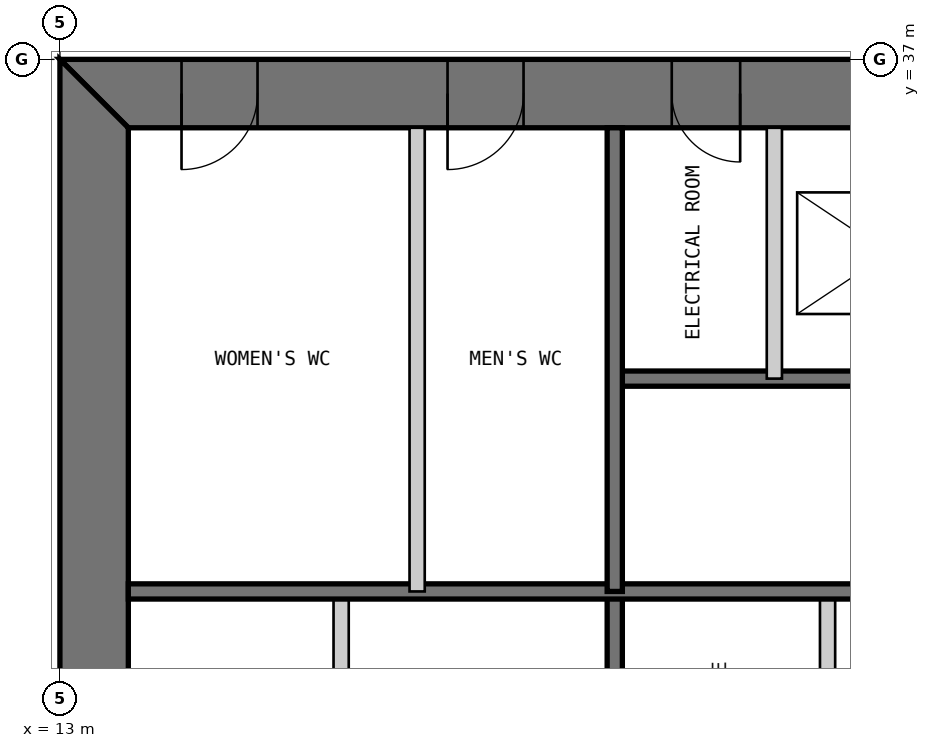
"""IFC4 building model, lengths in metres.
Left out: names, types, materials, properties, quantities, classifications, styles, units other than length and angle.
Written with IfcOpenShell. Run it as: python <this file> out.ifc"""

import sys

from ifc_helpers import new_model, si_unit, direction, frame, frame_2d, origin, place, context, subcontext, project, spatial, polyline, rectangle, outline, extrude, element, fill, save


model = new_model("IFC4")
c1 = context("Model", 3, precision=1e-05, world=origin(), true_north=direction((0.0, 1.0)))
c2 = subcontext(c1, "Body", "Model", "MODEL_VIEW")
j1 = project(units=[si_unit("LENGTHUNIT", "METRE"), si_unit("PLANEANGLEUNIT", "RADIAN")], contexts=[c1])
p1 = place(None, origin())
s1 = spatial("IfcSite", under=j1, at=p1, CompositionType="ELEMENT")
p2 = place(p1, origin())
s2 = spatial("IfcBuilding", under=s1, at=p2, CompositionType="ELEMENT")
p3 = place(p2, frame((0.0, 0.0, 293.4)))
s3 = spatial("IfcBuildingStorey", under=s2, at=p3, CompositionType="ELEMENT", Elevation=293.4)
p4 = place(p3, frame((37.0, 36.55, 0.0), z_axis=(0.0, 0.0, 1.0), x_axis=(-1.0, 0.0, 0.0)))
e1 = element("IfcWall", 1, at=p4, inside=s3, PredefinedType="SHEAR", context=c2, shape_type="SweptSolid", body=[
    extrude(outline(polyline([(0.0, -0.45), (24.0, -0.45), (23.1, 0.45), (0.9, 0.45), (0.0, -0.45)])), origin(), (0.0, 0.0, 1.0), 3.4),
])
p5 = place(p4, frame((4.9, 0.0, 0.0)))
e2 = element("IfcOpeningElement", 2, at=p5, cuts=e1, PredefinedType="OPENING", context=c2, shape_type="SweptSolid", body=[
    extrude(rectangle(XDim=1.0, YDim=2.2, at=frame_2d((0.5, 1.1))), frame((0.0, 0.46, 0.0), z_axis=(0.0, -1.0, 0.0), x_axis=(1.0, 0.0, 0.0)), (0.0, 0.0, 1.0), 0.92),
])
p6 = place(p4, frame((8.9, 0.0, 0.0)))
e3 = element("IfcOpeningElement", 3, at=p6, cuts=e1, PredefinedType="OPENING", context=c2, shape_type="SweptSolid", body=[
    extrude(rectangle(XDim=1.1, YDim=2.2, at=frame_2d((0.55, 1.1))), frame((0.0, 0.46, 0.0), z_axis=(0.0, -1.0, 0.0), x_axis=(1.0, 0.0, 0.0)), (0.0, 0.0, 1.0), 0.92),
])
p7 = place(p4, frame((15.05, 0.0, 0.0)))
e4 = element("IfcOpeningElement", 4, at=p7, cuts=e1, PredefinedType="OPENING", context=c2, shape_type="SweptSolid", body=[
    extrude(rectangle(XDim=0.9, YDim=2.2, at=frame_2d((0.45, 1.1))), frame((0.0, 0.46, 0.0), z_axis=(0.0, -1.0, 0.0), x_axis=(1.0, 0.0, 0.0)), (0.0, 0.0, 1.0), 0.92),
])
p8 = place(p4, frame((17.9, 0.0, 0.0)))
e5 = element("IfcOpeningElement", 5, at=p8, cuts=e1, PredefinedType="OPENING", context=c2, shape_type="SweptSolid", body=[
    extrude(rectangle(XDim=1.0, YDim=2.2, at=frame_2d((0.5, 1.1))), frame((0.0, 0.46, 0.0), z_axis=(0.0, -1.0, 0.0), x_axis=(1.0, 0.0, 0.0)), (0.0, 0.0, 1.0), 0.92),
])
p9 = place(p4, frame((21.4, 0.0, 0.0)))
e6 = element("IfcOpeningElement", 6, at=p9, cuts=e1, PredefinedType="OPENING", context=c2, shape_type="SweptSolid", body=[
    extrude(rectangle(XDim=1.0, YDim=2.2, at=frame_2d((0.5, 1.1))), frame((0.0, 0.46, 0.0), z_axis=(0.0, -1.0, 0.0), x_axis=(1.0, 0.0, 0.0)), (0.0, 0.0, 1.0), 0.92),
])
p10 = place(p3, frame((13.45, 36.1, 0.0), z_axis=(0.0, 0.0, 1.0), x_axis=(0.0, -1.0, 0.0)))
e7 = element("IfcWall", 7, at=p10, inside=s3, PredefinedType="SHEAR", context=c2, shape_type="SweptSolid", body=[
    extrude(outline(polyline([(-0.9, -0.45), (23.1, -0.45), (22.2, 0.45), (0.0, 0.45), (-0.9, -0.45)])), origin(), (0.0, 0.0, 1.0), 3.4),
])
p11 = place(p10, frame((20.2, 0.0, 0.0)))
e8 = element("IfcOpeningElement", 8, at=p11, cuts=e7, PredefinedType="OPENING", context=c2, shape_type="SweptSolid", body=[
    extrude(rectangle(XDim=1.0, YDim=2.2, at=frame_2d((0.5, 1.1))), frame((0.0, 0.46, 0.0), z_axis=(0.0, -1.0, 0.0), x_axis=(1.0, 0.0, 0.0)), (0.0, 0.0, 1.0), 0.92),
])
p12 = place(p10, frame((17.25, 0.0, 0.0)))
e9 = element("IfcOpeningElement", 9, at=p12, cuts=e7, PredefinedType="OPENING", context=c2, shape_type="SweptSolid", body=[
    extrude(rectangle(XDim=0.9, YDim=2.2, at=frame_2d((0.45, 1.1))), frame((0.0, 0.46, 0.0), z_axis=(0.0, -1.0, 0.0), x_axis=(1.0, 0.0, 0.0)), (0.0, 0.0, 1.0), 0.92),
])
p13 = place(p3, frame((16.7, 13.9, 0.0), z_axis=(0.0, 0.0, 1.0), x_axis=(0.0, 1.0, 0.0)))
e10 = element("IfcWall", 10, at=p13, inside=s3, PredefinedType="PARTITIONING", context=c2, shape_type="SweptSolid", body=[
    extrude(rectangle(XDim=16.1, YDim=0.2, at=frame_2d((8.05, 0.0))), origin(), (0.0, 0.0, 1.0), 3.2),
])
p14 = place(p13, frame((7.95, 0.0, 0.0)))
e11 = element("IfcOpeningElement", 11, at=p14, cuts=e10, PredefinedType="OPENING", context=c2, shape_type="SweptSolid", body=[
    extrude(rectangle(XDim=0.9, YDim=2.2, at=frame_2d((0.45, 1.1))), frame((0.0, 0.11, 0.0), z_axis=(0.0, -1.0, 0.0), x_axis=(1.0, 0.0, 0.0)), (0.0, 0.0, 1.0), 0.22),
])
p15 = place(p13, frame((13.3, 0.0, 0.0)))
e12 = element("IfcOpeningElement", 12, at=p15, cuts=e10, PredefinedType="OPENING", context=c2, shape_type="SweptSolid", body=[
    extrude(rectangle(XDim=0.9, YDim=2.2, at=frame_2d((0.45, 1.1))), frame((0.0, 0.11, 0.0), z_axis=(0.0, -1.0, 0.0), x_axis=(1.0, 0.0, 0.0)), (0.0, 0.0, 1.0), 0.22),
])
p16 = place(p3, frame((20.3, 13.9, 0.0), z_axis=(0.0, 0.0, 1.0), x_axis=(0.0, 1.0, 0.0)))
e13 = element("IfcWall", 13, at=p16, inside=s3, PredefinedType="SOLIDWALL", context=c2, shape_type="SweptSolid", body=[
    extrude(rectangle(XDim=16.1, YDim=0.2, at=frame_2d((8.05, 0.0))), origin(), (0.0, 0.0, 1.0), 3.2),
])
p17 = place(p16, frame((6.65, 0.0, 0.0)))
e14 = element("IfcOpeningElement", 14, at=p17, cuts=e13, PredefinedType="OPENING", context=c2, shape_type="SweptSolid", body=[
    extrude(rectangle(XDim=0.9, YDim=2.2, at=frame_2d((0.45, 1.1))), frame((0.0, 0.11, 0.0), z_axis=(0.0, -1.0, 0.0), x_axis=(1.0, 0.0, 0.0)), (0.0, 0.0, 1.0), 0.22),
])
p18 = place(p16, frame((9.35, 0.0, 0.0)))
e15 = element("IfcOpeningElement", 15, at=p18, cuts=e13, PredefinedType="OPENING", context=c2, shape_type="SweptSolid", body=[
    extrude(rectangle(XDim=0.9, YDim=2.2, at=frame_2d((0.45, 1.1))), frame((0.0, 0.11, 0.0), z_axis=(0.0, -1.0, 0.0), x_axis=(1.0, 0.0, 0.0)), (0.0, 0.0, 1.0), 0.22),
])
p19 = place(p16, frame((13.35, 0.0, 0.0)))
e16 = element("IfcOpeningElement", 16, at=p19, cuts=e13, PredefinedType="OPENING", context=c2, shape_type="SweptSolid", body=[
    extrude(rectangle(XDim=0.9, YDim=2.2, at=frame_2d((0.45, 1.1))), frame((0.0, 0.11, 0.0), z_axis=(0.0, -1.0, 0.0), x_axis=(1.0, 0.0, 0.0)), (0.0, 0.0, 1.0), 0.22),
])
p20 = place(p3, frame((23.1, 20.0, 0.0), z_axis=(0.0, 0.0, 1.0), x_axis=(0.0, 1.0, 0.0)))
e17 = element("IfcWall", 17, at=p20, inside=s3, PredefinedType="PARTITIONING", context=c2, shape_type="SweptSolid", body=[
    extrude(rectangle(XDim=10.0, YDim=0.2, at=frame_2d((5.0, 0.0))), origin(), (0.0, 0.0, 1.0), 3.2),
])
p21 = place(p3, frame((29.7, 32.8, 0.0), z_axis=(0.0, 0.0, 1.0), x_axis=(-1.0, 0.0, 0.0)))
e18 = element("IfcWall", 18, at=p21, inside=s3, PredefinedType="SOLIDWALL", context=c2, shape_type="SweptSolid", body=[
    extrude(rectangle(XDim=9.4, YDim=0.2, at=frame_2d((4.7, 0.0))), origin(), (0.0, 0.0, 1.0), 3.2),
])
p22 = place(p21, frame((0.25, 0.0, 0.0)))
e19 = element("IfcOpeningElement", 19, at=p22, cuts=e18, PredefinedType="OPENING", context=c2, shape_type="SweptSolid", body=[
    extrude(rectangle(XDim=1.0, YDim=2.2, at=frame_2d((0.5, 1.1))), frame((0.0, 0.11, 0.0), z_axis=(0.0, -1.0, 0.0), x_axis=(1.0, 0.0, 0.0)), (0.0, 0.0, 1.0), 0.22),
])
p23 = place(p3, frame((29.7, 30.0, 0.0), z_axis=(0.0, 0.0, 1.0), x_axis=(-1.0, 0.0, 0.0)))
e20 = element("IfcWall", 20, at=p23, inside=s3, PredefinedType="SOLIDWALL", context=c2, shape_type="SweptSolid", body=[
    extrude(rectangle(XDim=15.8, YDim=0.2, at=frame_2d((7.9, 0.0))), origin(), (0.0, 0.0, 1.0), 3.2),
])
p24 = place(p3, frame((22.4, 36.1, 0.0), z_axis=(0.0, 0.0, 1.0), x_axis=(0.0, -1.0, 0.0)))
e21 = element("IfcWall", 21, at=p24, inside=s3, PredefinedType="PARTITIONING", context=c2, shape_type="SweptSolid", body=[
    extrude(rectangle(XDim=3.3, YDim=0.2, at=frame_2d((1.65, 0.0))), origin(), (0.0, 0.0, 1.0), 3.2),
])
p25 = place(p3, frame((20.3, 36.1, 0.0), z_axis=(0.0, 0.0, 1.0), x_axis=(0.0, -1.0, 0.0)))
e22 = element("IfcWall", 22, at=p25, inside=s3, PredefinedType="SOLIDWALL", context=c2, shape_type="SweptSolid", body=[
    extrude(rectangle(XDim=6.1, YDim=0.2, at=frame_2d((3.05, 0.0))), origin(), (0.0, 0.0, 1.0), 3.2),
])
p26 = place(p3, frame((17.7, 36.1, 0.0), z_axis=(0.0, 0.0, 1.0), x_axis=(0.0, -1.0, 0.0)))
e23 = element("IfcWall", 23, at=p26, inside=s3, PredefinedType="PARTITIONING", context=c2, shape_type="SweptSolid", body=[
    extrude(rectangle(XDim=6.1, YDim=0.2, at=frame_2d((3.05, 0.0))), origin(), (0.0, 0.0, 1.0), 3.2),
])
p27 = place(p7, origin())
e24 = element("IfcDoor", 24, at=p27, inside=s3, OperationType="SINGLE_SWING_LEFT", PredefinedType="DOOR", context=c2, shape_type="SweptSolid", body=[
    extrude(rectangle(XDim=0.9, YDim=2.2, at=frame_2d((0.45, 1.1))), frame((0.0, 0.025, 0.0), z_axis=(0.0, -1.0, 0.0), x_axis=(1.0, 0.0, 0.0)), (0.0, 0.0, 1.0), 0.05),
    extrude(outline(polyline([(0.0, 0.0), (0.04, 0.0), (0.04, 2.16), (0.86, 2.16), (0.86, 0.0), (0.9, 0.0), (0.9, 2.2), (0.0, 2.2), (0.0, 0.0)])), frame((0.0, 0.3, 0.0), z_axis=(0.0, -1.0, 0.0), x_axis=(1.0, 0.0, 0.0)), (0.0, 0.0, 1.0), 0.6),
])
fill(e4, e24)
p28 = place(p8, origin())
e25 = element("IfcDoor", 25, at=p28, inside=s3, OperationType="SINGLE_SWING_RIGHT", PredefinedType="DOOR", context=c2, shape_type="SweptSolid", body=[
    extrude(rectangle(XDim=1.0, YDim=2.2, at=frame_2d((0.5, 1.1))), frame((0.0, 0.025, 0.0), z_axis=(0.0, -1.0, 0.0), x_axis=(1.0, 0.0, 0.0)), (0.0, 0.0, 1.0), 0.05),
    extrude(outline(polyline([(0.0, 0.0), (0.04, 0.0), (0.04, 2.16), (0.96, 2.16), (0.96, 0.0), (1.0, 0.0), (1.0, 2.2), (0.0, 2.2), (0.0, 0.0)])), frame((0.0, 0.3, 0.0), z_axis=(0.0, -1.0, 0.0), x_axis=(1.0, 0.0, 0.0)), (0.0, 0.0, 1.0), 0.6),
])
fill(e5, e25)
p29 = place(p9, origin())
e26 = element("IfcDoor", 26, at=p29, inside=s3, OperationType="SINGLE_SWING_RIGHT", PredefinedType="DOOR", context=c2, shape_type="SweptSolid", body=[
    extrude(rectangle(XDim=1.0, YDim=2.2, at=frame_2d((0.5, 1.1))), frame((0.0, 0.025, 0.0), z_axis=(0.0, -1.0, 0.0), x_axis=(1.0, 0.0, 0.0)), (0.0, 0.0, 1.0), 0.05),
    extrude(outline(polyline([(0.0, 0.0), (0.04, 0.0), (0.04, 2.16), (0.96, 2.16), (0.96, 0.0), (1.0, 0.0), (1.0, 2.2), (0.0, 2.2), (0.0, 0.0)])), frame((0.0, 0.3, 0.0), z_axis=(0.0, -1.0, 0.0), x_axis=(1.0, 0.0, 0.0)), (0.0, 0.0, 1.0), 0.6),
])
fill(e6, e26)
save(model, sys.argv[1])
